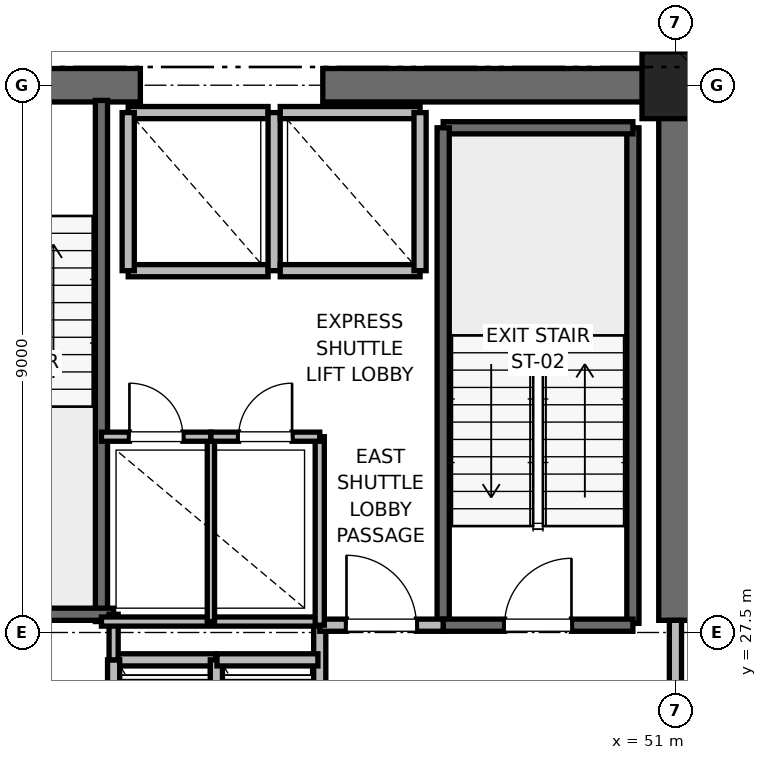
"""IFC4 building model, lengths in metres.
Left out: names, types, materials, properties, quantities, classifications, styles, units other than length and angle.
Written with IfcOpenShell. Run it as: python <this file> out.ifc"""

import sys

from ifc_helpers import new_model, si_unit, direction, frame, frame_2d, origin, origin_2d, place, context, subcontext, project, spatial, rectangle, extrude, element, fill, save


model = new_model("IFC4")
c1 = context("Model", 3, precision=1e-05, world=origin(), true_north=direction((0.0, 1.0)))
c2 = subcontext(c1, "Body", "Model", "MODEL_VIEW")
j1 = project(units=[si_unit("LENGTHUNIT", "METRE"), si_unit("PLANEANGLEUNIT", "RADIAN")], contexts=[c1])
p1 = place(None, origin())
s1 = spatial("IfcSite", under=j1, at=p1, CompositionType="ELEMENT")
p2 = place(p1, origin())
s2 = spatial("IfcBuilding", under=s1, at=p2, CompositionType="ELEMENT")
p3 = place(p2, frame((0.0, 0.0, 156.4)))
s3 = spatial("IfcBuildingStorey", under=s2, at=p3, CompositionType="ELEMENT", Elevation=156.4)
p4 = place(p3, frame((51.0, 36.5, 0.0), z_axis=(0.0, 0.0, 1.0), x_axis=(1.0, 0.0, 0.0)))
e1 = element("IfcColumn", 1, at=p4, inside=s3, PredefinedType="PILASTER", context=c2, shape_type="SweptSolid", body=[
    extrude(rectangle(XDim=1.1, YDim=1.1, at=origin_2d()), origin(), (0.0, 0.0, 1.0), 4.0),
])
p5 = place(p3, frame((37.8, 36.5, 0.0), z_axis=(0.0, 0.0, 1.0), x_axis=(1.0, 0.0, 0.0)))
e2 = element("IfcWall", 2, at=p5, inside=s3, PredefinedType="SHEAR", context=c2, shape_type="SweptSolid", body=[
    extrude(rectangle(XDim=4.4, YDim=0.55, at=frame_2d((2.2, 0.0))), origin(), (0.0, 0.0, 1.0), 3.775),
])
p6 = place(p5, frame((1.65, 0.0, 0.0)))
e3 = element("IfcOpeningElement", 3, at=p6, cuts=e2, PredefinedType="OPENING", context=c2, shape_type="SweptSolid", body=[
    extrude(rectangle(XDim=1.1, YDim=2.15, at=frame_2d((0.55, 1.075))), frame((0.0, 0.275, 0.0), z_axis=(0.0, -1.0, 0.0), x_axis=(1.0, 0.0, 0.0)), (0.0, 0.0, 1.0), 0.55),
])
p7 = place(p3, frame((45.2, 36.5, 0.0), z_axis=(0.0, 0.0, 1.0), x_axis=(1.0, 0.0, 0.0)))
e4 = element("IfcWall", 4, at=p7, inside=s3, PredefinedType="SHEAR", context=c2, shape_type="SweptSolid", body=[
    extrude(rectangle(XDim=5.8, YDim=0.55, at=frame_2d((2.9, 0.0))), origin(), (0.0, 0.0, 1.0), 3.775),
])
p8 = place(p3, frame((51.0, 27.7, 0.0), z_axis=(0.0, 0.0, 1.0), x_axis=(0.0, 1.0, 0.0)))
e5 = element("IfcWall", 5, at=p8, inside=s3, PredefinedType="SHEAR", context=c2, shape_type="SweptSolid", body=[
    extrude(rectangle(XDim=8.8, YDim=0.55, at=frame_2d((4.4, 0.0))), origin(), (0.0, 0.0, 1.0), 3.775),
])
p9 = place(p3, frame((50.3, 27.65, 0.0), z_axis=(0.0, 0.0, 1.0), x_axis=(0.0, 1.0, 0.0)))
e6 = element("IfcWall", 6, at=p9, inside=s3, PredefinedType="SOLIDWALL", context=c2, shape_type="SweptSolid", body=[
    extrude(rectangle(XDim=8.15, YDim=0.2, at=frame_2d((4.075, 0.0))), origin(), (0.0, 0.0, 1.0), 3.775),
])
p10 = place(p3, frame((47.18, 35.8, 0.0), z_axis=(0.0, 0.0, 1.0), x_axis=(1.0, 0.0, 0.0)))
e7 = element("IfcWall", 7, at=p10, inside=s3, PredefinedType="SOLIDWALL", context=c2, shape_type="SweptSolid", body=[
    extrude(rectangle(XDim=3.12, YDim=0.2, at=frame_2d((1.56, 0.0))), origin(), (0.0, 0.0, 1.0), 3.775),
])
p11 = place(p3, frame((47.18, 27.62, 0.0), z_axis=(0.0, 0.0, 1.0), x_axis=(0.0, 1.0, 0.0)))
e8 = element("IfcWall", 8, at=p11, inside=s3, PredefinedType="SOLIDWALL", context=c2, shape_type="SweptSolid", body=[
    extrude(rectangle(XDim=8.18, YDim=0.2, at=frame_2d((4.09, 0.0))), origin(), (0.0, 0.0, 1.0), 3.775),
])
p12 = place(p3, frame((47.18, 27.62, 0.0), z_axis=(0.0, 0.0, 1.0), x_axis=(1.0, 0.0, 0.0)))
e9 = element("IfcWall", 9, at=p12, inside=s3, PredefinedType="SOLIDWALL", context=c2, shape_type="SweptSolid", body=[
    extrude(rectangle(XDim=3.12, YDim=0.2, at=frame_2d((1.56, 0.0))), origin(), (0.0, 0.0, 1.0), 3.775),
])
p13 = place(p12, frame((1.01, 0.0, 0.0)))
e10 = element("IfcOpeningElement", 10, at=p13, cuts=e9, PredefinedType="OPENING", context=c2, shape_type="SweptSolid", body=[
    extrude(rectangle(XDim=1.1, YDim=2.15, at=frame_2d((0.55, 1.075))), frame((0.0, 0.1, 0.0), z_axis=(0.0, -1.0, 0.0), x_axis=(1.0, 0.0, 0.0)), (0.0, 0.0, 1.0), 0.2),
])
p14 = place(p3, frame((41.56, 27.68, 0.0), z_axis=(0.0, 0.0, 1.0), x_axis=(0.0, 1.0, 0.0)))
e11 = element("IfcWall", 11, at=p14, inside=s3, PredefinedType="SOLIDWALL", context=c2, shape_type="SweptSolid", body=[
    extrude(rectangle(XDim=8.57, YDim=0.2, at=frame_2d((4.285, 0.0))), origin(), (0.0, 0.0, 1.0), 3.775),
])
p15 = place(p3, frame((38.44, 27.8, 0.0), z_axis=(0.0, 0.0, 1.0), x_axis=(1.0, 0.0, 0.0)))
e12 = element("IfcWall", 12, at=p15, inside=s3, PredefinedType="SOLIDWALL", context=c2, shape_type="SweptSolid", body=[
    extrude(rectangle(XDim=3.32, YDim=0.2, at=frame_2d((1.66, 0.0))), origin(), (0.0, 0.0, 1.0), 3.775),
])
p16 = place(p3, frame((45.15, 24.25, 0.0), z_axis=(0.0, 0.0, 1.0), x_axis=(0.0, 1.0, 0.0)))
e13 = element("IfcWall", 13, at=p16, inside=s3, PredefinedType="PARTITIONING", context=c2, shape_type="SweptSolid", body=[
    extrude(rectangle(XDim=3.37, YDim=0.2, at=frame_2d((1.685, 0.0))), origin(), (0.0, 0.0, 1.0), 3.775),
])
p17 = place(p3, frame((45.15, 27.62, 0.0), z_axis=(0.0, 0.0, 1.0), x_axis=(1.0, 0.0, 0.0)))
e14 = element("IfcWall", 14, at=p17, inside=s3, PredefinedType="PARTITIONING", context=c2, shape_type="SweptSolid", body=[
    extrude(rectangle(XDim=2.03, YDim=0.2, at=frame_2d((1.015, 0.0))), origin(), (0.0, 0.0, 1.0), 3.775),
])
p18 = place(p17, frame((0.44, 0.0, 0.0)))
e15 = element("IfcOpeningElement", 15, at=p18, cuts=e14, PredefinedType="OPENING", context=c2, shape_type="SweptSolid", body=[
    extrude(rectangle(XDim=1.15, YDim=2.2, at=frame_2d((0.575, 1.1))), frame((0.0, 0.1, 0.0), z_axis=(0.0, -1.0, 0.0), x_axis=(1.0, 0.0, 0.0)), (0.0, 0.0, 1.0), 0.2),
])
p19 = place(p3, frame((51.0, 24.3, 0.0), z_axis=(0.0, 0.0, 1.0), x_axis=(0.0, 1.0, 0.0)))
e16 = element("IfcWall", 16, at=p19, inside=s3, PredefinedType="PARTITIONING", context=c2, shape_type="SweptSolid", body=[
    extrude(rectangle(XDim=3.4, YDim=0.2, at=frame_2d((1.7, 0.0))), origin(), (0.0, 0.0, 1.0), 2.755),
])
p20 = place(p19, frame((1.125, 0.0, 0.0)))
e17 = element("IfcOpeningElement", 17, at=p20, cuts=e16, PredefinedType="OPENING", context=c2, shape_type="SweptSolid", body=[
    extrude(rectangle(XDim=1.15, YDim=2.2, at=frame_2d((0.575, 1.1))), frame((0.0, 0.1, 0.0), z_axis=(0.0, -1.0, 0.0), x_axis=(1.0, 0.0, 0.0)), (0.0, 0.0, 1.0), 0.2),
])
p21 = place(p3, frame((43.44, 27.05, 0.0), z_axis=(0.0, 0.0, 1.0), x_axis=(-1.0, 0.0, 0.0)))
e18 = element("IfcWall", 18, at=p21, inside=s3, PredefinedType="SOLIDWALL", context=c2, shape_type="SweptSolid", body=[
    extrude(rectangle(XDim=1.68, YDim=0.2, at=frame_2d((0.84, 0.0))), origin(), (0.0, 0.0, 1.0), 3.775),
])
for number, where, z_axis, x_axis in (
    (19, (41.76, 27.05, 0.0), (0.0, 0.0, 1.0), (0.0, -1.0, 0.0)),
    (20, (43.45, 24.45, 0.0), (0.0, 0.0, 1.0), (0.0, 1.0, 0.0)),
):
    element("IfcWall", number, at=place(p3, frame(where, z_axis=z_axis, x_axis=x_axis)), inside=s3, PredefinedType="SOLIDWALL", context=c2, shape_type="SweptSolid", body=[
        extrude(rectangle(XDim=2.6, YDim=0.2, at=frame_2d((1.3, 0.0))), origin(), (0.0, 0.0, 1.0), 3.775),
    ])
p22 = place(p3, frame((45.12, 27.05, 0.0), z_axis=(0.0, 0.0, 1.0), x_axis=(-1.0, 0.0, 0.0)))
e21 = element("IfcWall", 21, at=p22, inside=s3, PredefinedType="SOLIDWALL", context=c2, shape_type="SweptSolid", body=[
    extrude(rectangle(XDim=1.66, YDim=0.2, at=frame_2d((0.83, 0.0))), origin(), (0.0, 0.0, 1.0), 3.775),
])
p23 = place(p3, frame((42.0, 33.45, 0.0), z_axis=(0.0, 0.0, 1.0), x_axis=(1.0, 0.0, 0.0)))
e22 = element("IfcWall", 22, at=p23, inside=s3, PredefinedType="SOLIDWALL", context=c2, shape_type="SweptSolid", body=[
    extrude(rectangle(XDim=2.3, YDim=0.2, at=frame_2d((1.15, 0.0))), origin(), (0.0, 0.0, 1.0), 3.775),
])
p24 = place(p3, frame((44.3, 36.05, 0.0), z_axis=(0.0, 0.0, 1.0), x_axis=(-1.0, 0.0, 0.0)))
e23 = element("IfcWall", 23, at=p24, inside=s3, PredefinedType="SOLIDWALL", context=c2, shape_type="SweptSolid", body=[
    extrude(rectangle(XDim=2.3, YDim=0.2, at=frame_2d((1.15, 0.0))), origin(), (0.0, 0.0, 1.0), 2.755),
])
for number, where, z_axis, x_axis in (
    (24, (42.0, 36.05, 0.0), (0.0, 0.0, 1.0), (0.0, -1.0, 0.0)),
    (25, (44.4, 33.45, 0.0), (0.0, 0.0, 1.0), (0.0, 1.0, 0.0)),
):
    element("IfcWall", number, at=place(p3, frame(where, z_axis=z_axis, x_axis=x_axis)), inside=s3, PredefinedType="SOLIDWALL", context=c2, shape_type="SweptSolid", body=[
        extrude(rectangle(XDim=2.6, YDim=0.2, at=frame_2d((1.3, 0.0))), origin(), (0.0, 0.0, 1.0), 2.755),
    ])
p25 = place(p3, frame((44.5, 33.45, 0.0), z_axis=(0.0, 0.0, 1.0), x_axis=(1.0, 0.0, 0.0)))
e26 = element("IfcWall", 26, at=p25, inside=s3, PredefinedType="SOLIDWALL", context=c2, shape_type="SweptSolid", body=[
    extrude(rectangle(XDim=2.3, YDim=0.2, at=frame_2d((1.15, 0.0))), origin(), (0.0, 0.0, 1.0), 3.775),
])
p26 = place(p3, frame((46.8, 36.05, 0.0), z_axis=(0.0, 0.0, 1.0), x_axis=(-1.0, 0.0, 0.0)))
e27 = element("IfcWall", 27, at=p26, inside=s3, PredefinedType="SOLIDWALL", context=c2, shape_type="SweptSolid", body=[
    extrude(rectangle(XDim=2.3, YDim=0.2, at=frame_2d((1.15, 0.0))), origin(), (0.0, 0.0, 1.0), 2.755),
])
p27 = place(p3, frame((46.8, 33.45, 0.0), z_axis=(0.0, 0.0, 1.0), x_axis=(0.0, 1.0, 0.0)))
e28 = element("IfcWall", 28, at=p27, inside=s3, PredefinedType="SOLIDWALL", context=c2, shape_type="SweptSolid", body=[
    extrude(rectangle(XDim=2.6, YDim=0.2, at=frame_2d((1.3, 0.0))), origin(), (0.0, 0.0, 1.0), 3.775),
])
p28 = place(p3, frame((41.76, 27.05, 0.0), z_axis=(0.0, 0.0, 1.0), x_axis=(0.0, 1.0, 0.0)))
e29 = element("IfcWall", 29, at=p28, inside=s3, PredefinedType="PARTITIONING", context=c2, shape_type="SweptSolid", body=[
    extrude(rectangle(XDim=0.75, YDim=0.15, at=frame_2d((0.375, 0.0))), origin(), (0.0, 0.0, 1.0), 2.85),
])
p29 = place(p3, frame((41.56, 27.68, 0.0), z_axis=(0.0, 0.0, 1.0), x_axis=(1.0, 0.0, 0.0)))
e30 = element("IfcWall", 30, at=p29, inside=s3, PredefinedType="PARTITIONING", context=c2, shape_type="SweptSolid", body=[
    extrude(rectangle(XDim=3.59, YDim=0.15, at=frame_2d((1.795, 0.0))), origin(), (0.0, 0.0, 1.0), 2.85),
])
p30 = place(p3, frame((45.15, 27.62, 0.0), z_axis=(0.0, 0.0, 1.0), x_axis=(0.0, 1.0, 0.0)))
e31 = element("IfcWall", 31, at=p30, inside=s3, PredefinedType="PARTITIONING", context=c2, shape_type="SweptSolid", body=[
    extrude(rectangle(XDim=3.1, YDim=0.15, at=frame_2d((1.55, 0.0))), origin(), (0.0, 0.0, 1.0), 2.85),
])
p31 = place(p3, frame((43.36, 27.68, 0.0), z_axis=(0.0, 0.0, 1.0), x_axis=(0.0, 1.0, 0.0)))
e32 = element("IfcWall", 32, at=p31, inside=s3, PredefinedType="PARTITIONING", context=c2, shape_type="SweptSolid", body=[
    extrude(rectangle(XDim=3.04, YDim=0.12, at=frame_2d((1.52, 0.0))), origin(), (0.0, 0.0, 1.0), 2.85),
])
p32 = place(p3, frame((41.56, 30.72, 0.0), z_axis=(0.0, 0.0, 1.0), x_axis=(1.0, 0.0, 0.0)))
e33 = element("IfcWall", 33, at=p32, inside=s3, PredefinedType="PARTITIONING", context=c2, shape_type="SweptSolid", body=[
    extrude(rectangle(XDim=1.8, YDim=0.15, at=frame_2d((0.9, 0.0))), origin(), (0.0, 0.0, 1.0), 2.85),
])
p33 = place(p32, frame((0.46, 0.0, 0.0)))
e34 = element("IfcOpeningElement", 34, at=p33, cuts=e33, PredefinedType="OPENING", context=c2, shape_type="SweptSolid", body=[
    extrude(rectangle(XDim=0.88, YDim=2.1, at=frame_2d((0.44, 1.05))), frame((0.0, 0.075, 0.0), z_axis=(0.0, -1.0, 0.0), x_axis=(1.0, 0.0, 0.0)), (0.0, 0.0, 1.0), 0.15),
])
p34 = place(p3, frame((43.36, 30.72, 0.0), z_axis=(0.0, 0.0, 1.0), x_axis=(1.0, 0.0, 0.0)))
e35 = element("IfcWall", 35, at=p34, inside=s3, PredefinedType="PARTITIONING", context=c2, shape_type="SweptSolid", body=[
    extrude(rectangle(XDim=1.79, YDim=0.15, at=frame_2d((0.895, 0.0))), origin(), (0.0, 0.0, 1.0), 2.85),
])
p35 = place(p34, frame((0.455, 0.0, 0.0)))
e36 = element("IfcOpeningElement", 36, at=p35, cuts=e35, PredefinedType="OPENING", context=c2, shape_type="SweptSolid", body=[
    extrude(rectangle(XDim=0.88, YDim=2.1, at=frame_2d((0.44, 1.05))), frame((0.0, 0.075, 0.0), z_axis=(0.0, -1.0, 0.0), x_axis=(1.0, 0.0, 0.0)), (0.0, 0.0, 1.0), 0.15),
])
p36 = place(p13, origin())
e37 = element("IfcDoor", 37, at=p36, inside=s3, OperationType="SINGLE_SWING_RIGHT", PredefinedType="DOOR", context=c2, shape_type="SweptSolid", body=[
    extrude(rectangle(XDim=1.1, YDim=2.15, at=frame_2d((0.55, 1.075))), frame((0.0, 0.025, 0.0), z_axis=(0.0, -1.0, 0.0), x_axis=(1.0, 0.0, 0.0)), (0.0, 0.0, 1.0), 0.05),
])
fill(e10, e37)
p37 = place(p18, origin())
e38 = element("IfcDoor", 38, at=p37, inside=s3, OperationType="SINGLE_SWING_LEFT", PredefinedType="DOOR", context=c2, shape_type="SweptSolid", body=[
    extrude(rectangle(XDim=1.15, YDim=2.2, at=frame_2d((0.575, 1.1))), frame((0.0, 0.025, 0.0), z_axis=(0.0, -1.0, 0.0), x_axis=(1.0, 0.0, 0.0)), (0.0, 0.0, 1.0), 0.05),
])
fill(e15, e38)
p38 = place(p33, origin())
e39 = element("IfcDoor", 39, at=p38, inside=s3, OperationType="SINGLE_SWING_LEFT", PredefinedType="DOOR", context=c2, shape_type="SweptSolid", body=[
    extrude(rectangle(XDim=0.88, YDim=2.1, at=frame_2d((0.44, 1.05))), frame((0.0, 0.025, 0.0), z_axis=(0.0, -1.0, 0.0), x_axis=(1.0, 0.0, 0.0)), (0.0, 0.0, 1.0), 0.05),
])
fill(e34, e39)
p39 = place(p35, origin())
e40 = element("IfcDoor", 40, at=p39, inside=s3, OperationType="SINGLE_SWING_RIGHT", PredefinedType="DOOR", context=c2, shape_type="SweptSolid", body=[
    extrude(rectangle(XDim=0.88, YDim=2.1, at=frame_2d((0.44, 1.05))), frame((0.0, 0.025, 0.0), z_axis=(0.0, -1.0, 0.0), x_axis=(1.0, 0.0, 0.0)), (0.0, 0.0, 1.0), 0.05),
])
fill(e36, e40)
save(model, sys.argv[1])
